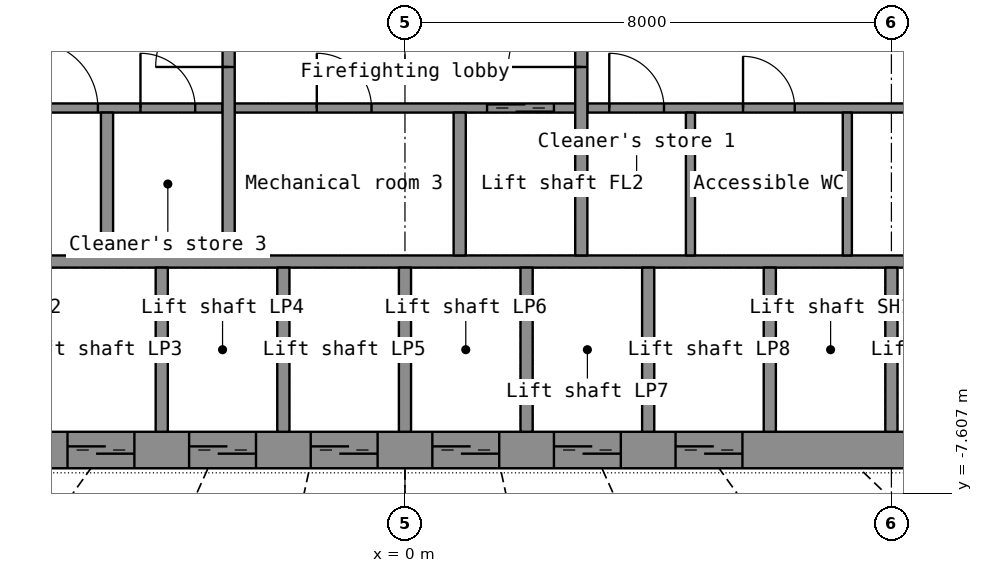
"""IFC4 building model, lengths in metres.
Left out: names, types, materials, properties, quantities, classifications, styles, units other than length and angle.
Written with IfcOpenShell. Run it as: python <this file> out.ifc"""

import sys

from ifc_helpers import new_model, si_unit, direction, frame, frame_2d, origin, place, context, subcontext, project, spatial, rectangle, extrude, element, fill, save


model = new_model("IFC4")
c1 = context("Model", 3, precision=1e-05, world=origin(), true_north=direction((0.0, 1.0)))
c2 = subcontext(c1, "Body", "Model", "MODEL_VIEW")
j1 = project(units=[si_unit("LENGTHUNIT", "METRE"), si_unit("PLANEANGLEUNIT", "RADIAN")], contexts=[c1])
p1 = place(None, origin())
s1 = spatial("IfcSite", under=j1, at=p1, CompositionType="ELEMENT")
p2 = place(p1, origin())
s2 = spatial("IfcBuilding", under=s1, at=p2, CompositionType="ELEMENT")
p3 = place(p2, frame((0.0, 0.0, 63.0)))
s3 = spatial("IfcBuildingStorey", under=s2, at=p3, CompositionType="ELEMENT", Elevation=63.0)
p4 = place(p3, frame((-11.4, -6.9, 0.0), z_axis=(0.0, 0.0, 1.0), x_axis=(1.0, 0.0, 0.0)))
e1 = element("IfcWall", 1, at=p4, inside=s3, PredefinedType="SHEAR", context=c2, shape_type="SweptSolid", body=[
    extrude(rectangle(XDim=22.8, YDim=0.6, at=frame_2d((11.4, 0.0))), origin(), (0.0, 0.0, 1.0), 3.3),
])
p5 = place(p4, frame((1.85, 0.0, 0.0)))
e2 = element("IfcOpeningElement", 2, at=p5, cuts=e1, PredefinedType="OPENING", context=c2, shape_type="SweptSolid", body=[
    extrude(rectangle(XDim=1.1, YDim=2.2, at=frame_2d((0.55, 1.1))), frame((0.0, 0.31, 0.0), z_axis=(0.0, -1.0, 0.0), x_axis=(1.0, 0.0, 0.0)), (0.0, 0.0, 1.0), 0.62),
])
p6 = place(p4, frame((3.85, 0.0, 0.0)))
e3 = element("IfcOpeningElement", 3, at=p6, cuts=e1, PredefinedType="OPENING", context=c2, shape_type="SweptSolid", body=[
    extrude(rectangle(XDim=1.1, YDim=2.2, at=frame_2d((0.55, 1.1))), frame((0.0, 0.31, 0.0), z_axis=(0.0, -1.0, 0.0), x_axis=(1.0, 0.0, 0.0)), (0.0, 0.0, 1.0), 0.62),
])
p7 = place(p4, frame((5.85, 0.0, 0.0)))
e4 = element("IfcOpeningElement", 4, at=p7, cuts=e1, PredefinedType="OPENING", context=c2, shape_type="SweptSolid", body=[
    extrude(rectangle(XDim=1.1, YDim=2.2, at=frame_2d((0.55, 1.1))), frame((0.0, 0.31, 0.0), z_axis=(0.0, -1.0, 0.0), x_axis=(1.0, 0.0, 0.0)), (0.0, 0.0, 1.0), 0.62),
])
p8 = place(p4, frame((7.85, 0.0, 0.0)))
e5 = element("IfcOpeningElement", 5, at=p8, cuts=e1, PredefinedType="OPENING", context=c2, shape_type="SweptSolid", body=[
    extrude(rectangle(XDim=1.1, YDim=2.2, at=frame_2d((0.55, 1.1))), frame((0.0, 0.31, 0.0), z_axis=(0.0, -1.0, 0.0), x_axis=(1.0, 0.0, 0.0)), (0.0, 0.0, 1.0), 0.62),
])
p9 = place(p4, frame((9.85, 0.0, 0.0)))
e6 = element("IfcOpeningElement", 6, at=p9, cuts=e1, PredefinedType="OPENING", context=c2, shape_type="SweptSolid", body=[
    extrude(rectangle(XDim=1.1, YDim=2.2, at=frame_2d((0.55, 1.1))), frame((0.0, 0.31, 0.0), z_axis=(0.0, -1.0, 0.0), x_axis=(1.0, 0.0, 0.0)), (0.0, 0.0, 1.0), 0.62),
])
p10 = place(p4, frame((11.85, 0.0, 0.0)))
e7 = element("IfcOpeningElement", 7, at=p10, cuts=e1, PredefinedType="OPENING", context=c2, shape_type="SweptSolid", body=[
    extrude(rectangle(XDim=1.1, YDim=2.2, at=frame_2d((0.55, 1.1))), frame((0.0, 0.31, 0.0), z_axis=(0.0, -1.0, 0.0), x_axis=(1.0, 0.0, 0.0)), (0.0, 0.0, 1.0), 0.62),
])
p11 = place(p4, frame((13.85, 0.0, 0.0)))
e8 = element("IfcOpeningElement", 8, at=p11, cuts=e1, PredefinedType="OPENING", context=c2, shape_type="SweptSolid", body=[
    extrude(rectangle(XDim=1.1, YDim=2.2, at=frame_2d((0.55, 1.1))), frame((0.0, 0.31, 0.0), z_axis=(0.0, -1.0, 0.0), x_axis=(1.0, 0.0, 0.0)), (0.0, 0.0, 1.0), 0.62),
])
p12 = place(p4, frame((15.85, 0.0, 0.0)))
e9 = element("IfcOpeningElement", 9, at=p12, cuts=e1, PredefinedType="OPENING", context=c2, shape_type="SweptSolid", body=[
    extrude(rectangle(XDim=1.1, YDim=2.2, at=frame_2d((0.55, 1.1))), frame((0.0, 0.31, 0.0), z_axis=(0.0, -1.0, 0.0), x_axis=(1.0, 0.0, 0.0)), (0.0, 0.0, 1.0), 0.62),
])
p13 = place(p4, frame((19.85, 0.0, 0.0)))
e10 = element("IfcOpeningElement", 10, at=p13, cuts=e1, PredefinedType="OPENING", context=c2, shape_type="SweptSolid", body=[
    extrude(rectangle(XDim=1.1, YDim=2.2, at=frame_2d((0.55, 1.1))), frame((0.0, 0.31, 0.0), z_axis=(0.0, -1.0, 0.0), x_axis=(1.0, 0.0, 0.0)), (0.0, 0.0, 1.0), 0.62),
])
p14 = place(p4, frame((0.25, 0.0, 0.0)))
e11 = element("IfcOpeningElement", 11, at=p14, cuts=e1, PredefinedType="OPENING", context=c2, shape_type="SweptSolid", body=[
    extrude(rectangle(XDim=0.8, YDim=2.05, at=frame_2d((0.4, 1.025))), frame((0.0, 0.31, 0.0), z_axis=(0.0, -1.0, 0.0), x_axis=(1.0, 0.0, 0.0)), (0.0, 0.0, 1.0), 0.62),
])
p15 = place(p4, frame((21.75, 0.0, 0.0)))
e12 = element("IfcOpeningElement", 12, at=p15, cuts=e1, PredefinedType="OPENING", context=c2, shape_type="SweptSolid", body=[
    extrude(rectangle(XDim=0.8, YDim=2.05, at=frame_2d((0.4, 1.025))), frame((0.0, 0.31, 0.0), z_axis=(0.0, -1.0, 0.0), x_axis=(1.0, 0.0, 0.0)), (0.0, 0.0, 1.0), 0.62),
])
p16 = place(p3, frame((-11.4, -3.8, 0.0), z_axis=(0.0, 0.0, 1.0), x_axis=(1.0, 0.0, 0.0)))
e13 = element("IfcWall", 13, at=p16, inside=s3, PredefinedType="SHEAR", context=c2, shape_type="SweptSolid", body=[
    extrude(rectangle(XDim=22.8, YDim=0.2, at=frame_2d((11.4, 0.0))), origin(), (0.0, 0.0, 1.0), 3.3),
])
for number, where, z_axis, x_axis in (
    (14, (-4.0, -6.6, 0.0), (0.0, 0.0, 1.0), (0.0, 1.0, 0.0)),
    (15, (-2.0, -6.6, 0.0), (0.0, 0.0, 1.0), (0.0, 1.0, 0.0)),
    (16, (0.0, -6.6, 0.0), (0.0, 0.0, 1.0), (0.0, 1.0, 0.0)),
    (17, (2.0, -6.6, 0.0), (0.0, 0.0, 1.0), (0.0, 1.0, 0.0)),
    (18, (4.0, -6.6, 0.0), (0.0, 0.0, 1.0), (0.0, 1.0, 0.0)),
    (19, (6.0, -6.6, 0.0), (0.0, 0.0, 1.0), (0.0, 1.0, 0.0)),
    (20, (8.0, -6.6, 0.0), (0.0, 0.0, 1.0), (0.0, 1.0, 0.0)),
):
    element("IfcWall", number, at=place(p3, frame(where, z_axis=z_axis, x_axis=x_axis)), inside=s3, PredefinedType="SHEAR", context=c2, shape_type="SweptSolid", body=[
        extrude(rectangle(XDim=2.7, YDim=0.2, at=frame_2d((1.35, 0.0))), origin(), (0.0, 0.0, 1.0), 3.3),
    ])
p17 = place(p3, frame((-11.4, -1.275, 0.0), z_axis=(0.0, 0.0, 1.0), x_axis=(1.0, 0.0, 0.0)))
e21 = element("IfcWall", 21, at=p17, inside=s3, PredefinedType="SHEAR", context=c2, shape_type="SweptSolid", body=[
    extrude(rectangle(XDim=8.4, YDim=0.15, at=frame_2d((4.2, 0.0))), origin(), (0.0, 0.0, 1.0), 3.3),
])
p18 = place(p17, frame((5.25, 0.0, 0.0)))
e22 = element("IfcOpeningElement", 22, at=p18, cuts=e21, PredefinedType="OPENING", context=c2, shape_type="SweptSolid", body=[
    extrude(rectangle(XDim=1.1, YDim=2.15, at=frame_2d((0.55, 1.075))), frame((0.0, 0.085, 0.0), z_axis=(0.0, -1.0, 0.0), x_axis=(1.0, 0.0, 0.0)), (0.0, 0.0, 1.0), 0.17),
])
p19 = place(p17, frame((7.05, 0.0, 0.0)))
e23 = element("IfcOpeningElement", 23, at=p19, cuts=e21, PredefinedType="OPENING", context=c2, shape_type="SweptSolid", body=[
    extrude(rectangle(XDim=0.9, YDim=2.1, at=frame_2d((0.45, 1.05))), frame((0.0, 0.085, 0.0), z_axis=(0.0, -1.0, 0.0), x_axis=(1.0, 0.0, 0.0)), (0.0, 0.0, 1.0), 0.17),
])
p20 = place(p3, frame((-2.8, -1.275, 0.0), z_axis=(0.0, 0.0, 1.0), x_axis=(1.0, 0.0, 0.0)))
e24 = element("IfcWall", 24, at=p20, inside=s3, PredefinedType="SHEAR", context=c2, shape_type="SweptSolid", body=[
    extrude(rectangle(XDim=5.6, YDim=0.15, at=frame_2d((2.8, 0.0))), origin(), (0.0, 0.0, 1.0), 3.3),
])
p21 = place(p20, frame((4.15, 0.0, 0.0)))
e25 = element("IfcOpeningElement", 25, at=p21, cuts=e24, PredefinedType="OPENING", context=c2, shape_type="SweptSolid", body=[
    extrude(rectangle(XDim=1.1, YDim=2.2, at=frame_2d((0.55, 1.1))), frame((0.0, 0.085, 0.0), z_axis=(0.0, -1.0, 0.0), x_axis=(1.0, 0.0, 0.0)), (0.0, 0.0, 1.0), 0.17),
])
p22 = place(p20, frame((1.35, 0.0, 0.0)))
e26 = element("IfcOpeningElement", 26, at=p22, cuts=e24, PredefinedType="OPENING", context=c2, shape_type="SweptSolid", body=[
    extrude(rectangle(XDim=0.9, YDim=2.1, at=frame_2d((0.45, 1.05))), frame((0.0, 0.085, 0.0), z_axis=(0.0, -1.0, 0.0), x_axis=(1.0, 0.0, 0.0)), (0.0, 0.0, 1.0), 0.17),
])
p23 = place(p3, frame((3.0, -1.275, 0.0), z_axis=(0.0, 0.0, 1.0), x_axis=(1.0, 0.0, 0.0)))
e27 = element("IfcWall", 27, at=p23, inside=s3, PredefinedType="PARTITIONING", context=c2, shape_type="SweptSolid", body=[
    extrude(rectangle(XDim=8.4, YDim=0.15, at=frame_2d((4.2, 0.0))), origin(), (0.0, 0.0, 1.0), 3.3),
])
p24 = place(p23, frame((0.36, 0.0, 0.0)))
e28 = element("IfcOpeningElement", 28, at=p24, cuts=e27, PredefinedType="OPENING", context=c2, shape_type="SweptSolid", body=[
    extrude(rectangle(XDim=0.9, YDim=2.1, at=frame_2d((0.45, 1.05))), frame((0.0, 0.085, 0.0), z_axis=(0.0, -1.0, 0.0), x_axis=(1.0, 0.0, 0.0)), (0.0, 0.0, 1.0), 0.17),
])
p25 = place(p23, frame((2.56, 0.0, 0.0)))
e29 = element("IfcOpeningElement", 29, at=p25, cuts=e27, PredefinedType="OPENING", context=c2, shape_type="SweptSolid", body=[
    extrude(rectangle(XDim=0.85, YDim=2.1, at=frame_2d((0.425, 1.05))), frame((0.0, 0.085, 0.0), z_axis=(0.0, -1.0, 0.0), x_axis=(1.0, 0.0, 0.0)), (0.0, 0.0, 1.0), 0.17),
])
p26 = place(p23, frame((5.95, 0.0, 0.0)))
e30 = element("IfcOpeningElement", 30, at=p26, cuts=e27, PredefinedType="OPENING", context=c2, shape_type="SweptSolid", body=[
    extrude(rectangle(XDim=0.85, YDim=2.1, at=frame_2d((0.425, 1.05))), frame((0.0, 0.085, 0.0), z_axis=(0.0, -1.0, 0.0), x_axis=(1.0, 0.0, 0.0)), (0.0, 0.0, 1.0), 0.17),
])
p27 = place(p3, frame((-2.9, -3.7, 0.0), z_axis=(0.0, 0.0, 1.0), x_axis=(0.0, 1.0, 0.0)))
e31 = element("IfcWall", 31, at=p27, inside=s3, PredefinedType="SHEAR", context=c2, shape_type="SweptSolid", body=[
    extrude(rectangle(XDim=7.4, YDim=0.2, at=frame_2d((3.7, 0.0))), origin(), (0.0, 0.0, 1.0), 3.3),
])
p28 = place(p27, frame((3.1, 0.0, 0.0)))
e32 = element("IfcOpeningElement", 32, at=p28, cuts=e31, PredefinedType="OPENING", context=c2, shape_type="SweptSolid", body=[
    extrude(rectangle(XDim=1.2, YDim=2.2, at=frame_2d((0.6, 1.1))), frame((0.0, 0.11, 0.0), z_axis=(0.0, -1.0, 0.0), x_axis=(1.0, 0.0, 0.0)), (0.0, 0.0, 1.0), 0.22),
])
p29 = place(p3, frame((2.9, -3.7, 0.0), z_axis=(0.0, 0.0, 1.0), x_axis=(0.0, 1.0, 0.0)))
e33 = element("IfcWall", 33, at=p29, inside=s3, PredefinedType="SHEAR", context=c2, shape_type="SweptSolid", body=[
    extrude(rectangle(XDim=7.4, YDim=0.2, at=frame_2d((3.7, 0.0))), origin(), (0.0, 0.0, 1.0), 3.3),
])
p30 = place(p29, frame((3.1, 0.0, 0.0)))
e34 = element("IfcOpeningElement", 34, at=p30, cuts=e33, PredefinedType="OPENING", context=c2, shape_type="SweptSolid", body=[
    extrude(rectangle(XDim=1.2, YDim=2.2, at=frame_2d((0.6, 1.1))), frame((0.0, 0.11, 0.0), z_axis=(0.0, -1.0, 0.0), x_axis=(1.0, 0.0, 0.0)), (0.0, 0.0, 1.0), 0.22),
])
for number, where, z_axis, x_axis in (
    (35, (0.9, -3.7, 0.0), (0.0, 0.0, 1.0), (0.0, 1.0, 0.0)),
    (36, (-4.9, -3.7, 0.0), (0.0, 0.0, 1.0), (0.0, 1.0, 0.0)),
):
    element("IfcWall", number, at=place(p3, frame(where, z_axis=z_axis, x_axis=x_axis)), inside=s3, PredefinedType="SHEAR", context=c2, shape_type="SweptSolid", body=[
        extrude(rectangle(XDim=2.35, YDim=0.2, at=frame_2d((1.175, 0.0))), origin(), (0.0, 0.0, 1.0), 3.3),
    ])
for number, where, z_axis, x_axis in (
    (37, (4.695, -3.7, 0.0), (0.0, 0.0, 1.0), (0.0, 1.0, 0.0)),
    (38, (7.275, -3.7, 0.0), (0.0, 0.0, 1.0), (0.0, 1.0, 0.0)),
):
    element("IfcWall", number, at=place(p3, frame(where, z_axis=z_axis, x_axis=x_axis)), inside=s3, PredefinedType="PARTITIONING", context=c2, shape_type="SweptSolid", body=[
        extrude(rectangle(XDim=2.35, YDim=0.15, at=frame_2d((1.175, 0.0))), origin(), (0.0, 0.0, 1.0), 3.3),
    ])
p31 = place(p7, origin())
e39 = element("IfcDoor", 39, at=p31, inside=s3, OperationType="DOUBLE_DOOR_SLIDING", PredefinedType="DOOR", context=c2, shape_type="SweptSolid", body=[
    extrude(rectangle(XDim=1.1, YDim=2.2, at=frame_2d((0.55, 1.1))), frame((0.0, 0.025, 0.0), z_axis=(0.0, -1.0, 0.0), x_axis=(1.0, 0.0, 0.0)), (0.0, 0.0, 1.0), 0.05),
])
fill(e4, e39)
p32 = place(p8, origin())
e40 = element("IfcDoor", 40, at=p32, inside=s3, OperationType="DOUBLE_DOOR_SLIDING", PredefinedType="DOOR", context=c2, shape_type="SweptSolid", body=[
    extrude(rectangle(XDim=1.1, YDim=2.2, at=frame_2d((0.55, 1.1))), frame((0.0, 0.025, 0.0), z_axis=(0.0, -1.0, 0.0), x_axis=(1.0, 0.0, 0.0)), (0.0, 0.0, 1.0), 0.05),
])
fill(e5, e40)
p33 = place(p9, origin())
e41 = element("IfcDoor", 41, at=p33, inside=s3, OperationType="DOUBLE_DOOR_SLIDING", PredefinedType="DOOR", context=c2, shape_type="SweptSolid", body=[
    extrude(rectangle(XDim=1.1, YDim=2.2, at=frame_2d((0.55, 1.1))), frame((0.0, 0.025, 0.0), z_axis=(0.0, -1.0, 0.0), x_axis=(1.0, 0.0, 0.0)), (0.0, 0.0, 1.0), 0.05),
])
fill(e6, e41)
p34 = place(p10, origin())
e42 = element("IfcDoor", 42, at=p34, inside=s3, OperationType="DOUBLE_DOOR_SLIDING", PredefinedType="DOOR", context=c2, shape_type="SweptSolid", body=[
    extrude(rectangle(XDim=1.1, YDim=2.2, at=frame_2d((0.55, 1.1))), frame((0.0, 0.025, 0.0), z_axis=(0.0, -1.0, 0.0), x_axis=(1.0, 0.0, 0.0)), (0.0, 0.0, 1.0), 0.05),
])
fill(e7, e42)
p35 = place(p11, origin())
e43 = element("IfcDoor", 43, at=p35, inside=s3, OperationType="DOUBLE_DOOR_SLIDING", PredefinedType="DOOR", context=c2, shape_type="SweptSolid", body=[
    extrude(rectangle(XDim=1.1, YDim=2.2, at=frame_2d((0.55, 1.1))), frame((0.0, 0.025, 0.0), z_axis=(0.0, -1.0, 0.0), x_axis=(1.0, 0.0, 0.0)), (0.0, 0.0, 1.0), 0.05),
])
fill(e8, e43)
p36 = place(p12, origin())
e44 = element("IfcDoor", 44, at=p36, inside=s3, OperationType="DOUBLE_DOOR_SLIDING", PredefinedType="DOOR", context=c2, shape_type="SweptSolid", body=[
    extrude(rectangle(XDim=1.1, YDim=2.2, at=frame_2d((0.55, 1.1))), frame((0.0, 0.025, 0.0), z_axis=(0.0, -1.0, 0.0), x_axis=(1.0, 0.0, 0.0)), (0.0, 0.0, 1.0), 0.05),
])
fill(e9, e44)
p37 = place(p28, origin())
e45 = element("IfcDoor", 45, at=p37, inside=s3, OperationType="SINGLE_SWING_LEFT", PredefinedType="DOOR", context=c2, shape_type="SweptSolid", body=[
    extrude(rectangle(XDim=1.2, YDim=2.2, at=frame_2d((0.6, 1.1))), frame((0.0, 0.025, 0.0), z_axis=(0.0, -1.0, 0.0), x_axis=(1.0, 0.0, 0.0)), (0.0, 0.0, 1.0), 0.05),
])
fill(e32, e45)
p38 = place(p30, origin())
e46 = element("IfcDoor", 46, at=p38, inside=s3, OperationType="SINGLE_SWING_LEFT", PredefinedType="DOOR", context=c2, shape_type="SweptSolid", body=[
    extrude(rectangle(XDim=1.2, YDim=2.2, at=frame_2d((0.6, 1.1))), frame((0.0, 0.025, 0.0), z_axis=(0.0, -1.0, 0.0), x_axis=(1.0, 0.0, 0.0)), (0.0, 0.0, 1.0), 0.05),
])
fill(e34, e46)
p39 = place(p21, origin())
e47 = element("IfcDoor", 47, at=p39, inside=s3, OperationType="DOUBLE_DOOR_SLIDING", PredefinedType="DOOR", context=c2, shape_type="SweptSolid", body=[
    extrude(rectangle(XDim=1.1, YDim=2.2, at=frame_2d((0.55, 1.1))), frame((0.0, 0.025, 0.0), z_axis=(0.0, -1.0, 0.0), x_axis=(1.0, 0.0, 0.0)), (0.0, 0.0, 1.0), 0.05),
])
fill(e25, e47)
p40 = place(p18, origin())
e48 = element("IfcDoor", 48, at=p40, inside=s3, OperationType="SINGLE_SWING_LEFT", PredefinedType="DOOR", context=c2, shape_type="SweptSolid", body=[
    extrude(rectangle(XDim=1.1, YDim=2.15, at=frame_2d((0.55, 1.075))), frame((0.0, 0.025, 0.0), z_axis=(0.0, -1.0, 0.0), x_axis=(1.0, 0.0, 0.0)), (0.0, 0.0, 1.0), 0.05),
])
fill(e22, e48)
p41 = place(p24, origin())
e49 = element("IfcDoor", 49, at=p41, inside=s3, OperationType="SINGLE_SWING_LEFT", PredefinedType="DOOR", context=c2, shape_type="SweptSolid", body=[
    extrude(rectangle(XDim=0.9, YDim=2.1, at=frame_2d((0.45, 1.05))), frame((0.0, 0.025, 0.0), z_axis=(0.0, -1.0, 0.0), x_axis=(1.0, 0.0, 0.0)), (0.0, 0.0, 1.0), 0.05),
])
fill(e28, e49)
p42 = place(p25, origin())
e50 = element("IfcDoor", 50, at=p42, inside=s3, OperationType="SINGLE_SWING_LEFT", PredefinedType="DOOR", context=c2, shape_type="SweptSolid", body=[
    extrude(rectangle(XDim=0.85, YDim=2.1, at=frame_2d((0.425, 1.05))), frame((0.0, 0.025, 0.0), z_axis=(0.0, -1.0, 0.0), x_axis=(1.0, 0.0, 0.0)), (0.0, 0.0, 1.0), 0.05),
])
fill(e29, e50)
p43 = place(p22, origin())
e51 = element("IfcDoor", 51, at=p43, inside=s3, OperationType="SINGLE_SWING_LEFT", PredefinedType="DOOR", context=c2, shape_type="SweptSolid", body=[
    extrude(rectangle(XDim=0.9, YDim=2.1, at=frame_2d((0.45, 1.05))), frame((0.0, 0.025, 0.0), z_axis=(0.0, -1.0, 0.0), x_axis=(1.0, 0.0, 0.0)), (0.0, 0.0, 1.0), 0.05),
])
fill(e26, e51)
p44 = place(p19, origin())
e52 = element("IfcDoor", 52, at=p44, inside=s3, OperationType="SINGLE_SWING_LEFT", PredefinedType="DOOR", context=c2, shape_type="SweptSolid", body=[
    extrude(rectangle(XDim=0.9, YDim=2.1, at=frame_2d((0.45, 1.05))), frame((0.0, 0.025, 0.0), z_axis=(0.0, -1.0, 0.0), x_axis=(1.0, 0.0, 0.0)), (0.0, 0.0, 1.0), 0.05),
])
fill(e23, e52)
save(model, sys.argv[1])
